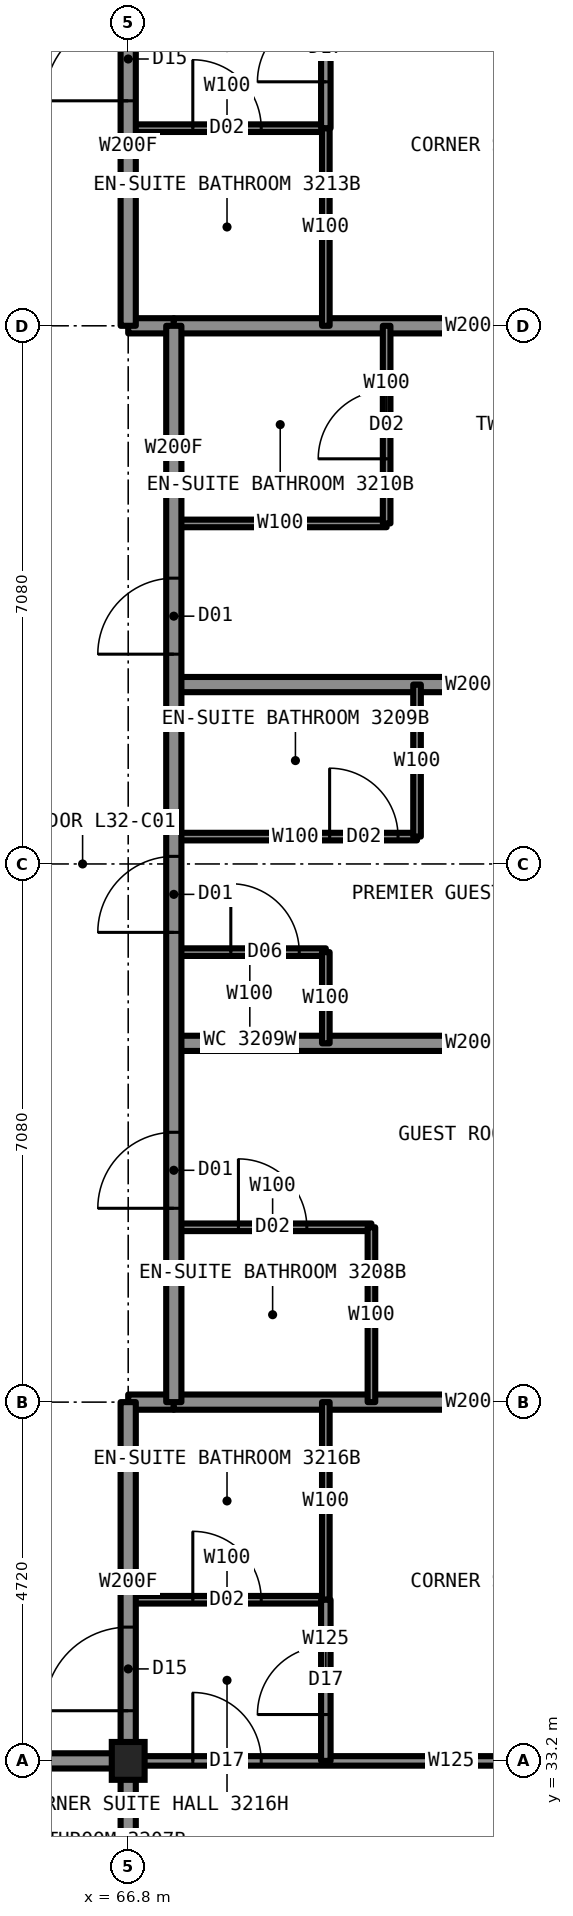
"""IFC4 building model, lengths in metres.
Left out: names, types, materials, properties, quantities, classifications, styles, units other than length and angle.
Written with IfcOpenShell. Run it as: python <this file> out.ifc"""

import sys

from ifc_helpers import new_model, si_unit, direction, frame, frame_2d, origin, origin_2d, place, context, subcontext, project, spatial, rectangle, i_section, extrude, element, fill, save


model = new_model("IFC4")
c1 = context("Model", 3, precision=1e-05, world=origin(), true_north=direction((0.0, 1.0)))
c2 = subcontext(c1, "Body", "Model", "MODEL_VIEW")
j1 = project(units=[si_unit("LENGTHUNIT", "METRE"), si_unit("PLANEANGLEUNIT", "RADIAN")], contexts=[c1])
p1 = place(None, origin())
s1 = spatial("IfcSite", under=j1, at=p1, CompositionType="ELEMENT")
p2 = place(p1, origin())
s2 = spatial("IfcBuilding", under=s1, at=p2, CompositionType="ELEMENT")
p3 = place(p2, frame((0.0, 0.0, 114.4)))
s3 = spatial("IfcBuildingStorey", under=s2, at=p3, CompositionType="ELEMENT", Elevation=114.4)
p4 = place(p3, frame((66.8, 33.2, 0.0), z_axis=(0.0, 0.0, 1.0), x_axis=(1.0, 0.0, 0.0)))
e1 = element("IfcColumn", 1, at=p4, inside=s3, PredefinedType="COLUMN", context=c2, shape_type="SweptSolid", body=[
    extrude(i_section(OverallWidth=0.432, OverallDepth=0.498, WebThickness=0.056, FlangeThickness=0.089, at=origin_2d()), origin(), (0.0, 0.0, 1.0), 3.5),
])
p5 = place(p3, frame((67.4, 43.84, 0.0), z_axis=(0.0, 0.0, 1.0), x_axis=(1.0, 0.0, 0.0)))
e2 = element("IfcWall", 2, at=p5, inside=s3, PredefinedType="PARTITIONING", context=c2, shape_type="SweptSolid", body=[
    extrude(rectangle(XDim=2.0, YDim=0.1, at=frame_2d((1.0, 0.0))), origin(), (0.0, 0.0, 1.0), 3.33),
])
p6 = place(p5, frame((0.75, 0.0, 0.0)))
e3 = element("IfcOpeningElement", 3, at=p6, cuts=e2, PredefinedType="OPENING", context=c2, shape_type="SweptSolid", body=[
    extrude(rectangle(XDim=0.9, YDim=2.1, at=frame_2d((0.45, 1.05))), frame((0.0, 0.06, 0.0), z_axis=(0.0, -1.0, 0.0), x_axis=(1.0, 0.0, 0.0)), (0.0, 0.0, 1.0), 0.12),
])
p7 = place(p3, frame((43.2, 33.2, 0.0), z_axis=(0.0, 0.0, 1.0), x_axis=(1.0, 0.0, 0.0)))
e4 = element("IfcWall", 4, at=p7, inside=s3, PredefinedType="PARTITIONING", context=c2, shape_type="SweptSolid", body=[
    extrude(rectangle(XDim=23.6, YDim=0.2, at=frame_2d((11.8, 0.0))), origin(), (0.0, 0.0, 1.0), 3.33),
])
p8 = place(p7, frame((0.7, 0.0, 0.0)))
e5 = element("IfcOpeningElement", 5, at=p8, cuts=e4, PredefinedType="OPENING", context=c2, shape_type="SweptSolid", body=[
    extrude(rectangle(XDim=1.0, YDim=2.2, at=frame_2d((0.5, 1.1))), frame((0.0, 0.11, 0.0), z_axis=(0.0, -1.0, 0.0), x_axis=(1.0, 0.0, 0.0)), (0.0, 0.0, 1.0), 0.22),
])
p9 = place(p7, frame((6.57, 0.0, 0.0)))
e6 = element("IfcOpeningElement", 6, at=p9, cuts=e4, PredefinedType="OPENING", context=c2, shape_type="SweptSolid", body=[
    extrude(rectangle(XDim=1.1, YDim=2.2, at=frame_2d((0.55, 1.1))), frame((0.0, 0.11, 0.0), z_axis=(0.0, -1.0, 0.0), x_axis=(1.0, 0.0, 0.0)), (0.0, 0.0, 1.0), 0.22),
])
p10 = place(p7, frame((20.34, 0.0, 0.0)))
e7 = element("IfcOpeningElement", 7, at=p10, cuts=e4, PredefinedType="OPENING", context=c2, shape_type="SweptSolid", body=[
    extrude(rectangle(XDim=1.0, YDim=2.2, at=frame_2d((0.5, 1.1))), frame((0.0, 0.11, 0.0), z_axis=(0.0, -1.0, 0.0), x_axis=(1.0, 0.0, 0.0)), (0.0, 0.0, 1.0), 0.22),
])
p11 = place(p3, frame((66.8, 33.2, 0.0), z_axis=(0.0, 0.0, 1.0), x_axis=(1.0, 0.0, 0.0)))
e8 = element("IfcWall", 8, at=p11, inside=s3, PredefinedType="PARTITIONING", context=c2, shape_type="SweptSolid", body=[
    extrude(rectangle(XDim=8.5, YDim=0.125, at=frame_2d((4.25, 0.0))), origin(), (0.0, 0.0, 1.0), 2.573),
])
p12 = place(p11, frame((0.85, 0.0, 0.0)))
e9 = element("IfcOpeningElement", 9, at=p12, cuts=e8, PredefinedType="OPENING", context=c2, shape_type="SweptSolid", body=[
    extrude(rectangle(XDim=0.9, YDim=2.2, at=frame_2d((0.45, 1.1))), frame((0.0, 0.073, 0.0), z_axis=(0.0, -1.0, 0.0), x_axis=(1.0, 0.0, 0.0)), (0.0, 0.0, 1.0), 0.145),
])
p13 = place(p3, frame((67.4, 42.64, 0.0), z_axis=(0.0, 0.0, 1.0), x_axis=(1.0, 0.0, 0.0)))
e10 = element("IfcWall", 10, at=p13, inside=s3, PredefinedType="PARTITIONING", context=c2, shape_type="SweptSolid", body=[
    extrude(rectangle(XDim=7.9, YDim=0.2, at=frame_2d((3.95, 0.0))), origin(), (0.0, 0.0, 1.0), 2.731),
])
p14 = place(p3, frame((67.4, 40.22, 0.0), z_axis=(0.0, 0.0, 1.0), x_axis=(1.0, 0.0, 0.0)))
e11 = element("IfcWall", 11, at=p14, inside=s3, PredefinedType="PARTITIONING", context=c2, shape_type="SweptSolid", body=[
    extrude(rectangle(XDim=2.6, YDim=0.1, at=frame_2d((1.3, 0.0))), origin(), (0.0, 0.0, 1.0), 2.731),
])
p15 = place(p14, frame((0.85, 0.0, 0.0)))
e12 = element("IfcOpeningElement", 12, at=p15, cuts=e11, PredefinedType="OPENING", context=c2, shape_type="SweptSolid", body=[
    extrude(rectangle(XDim=0.9, YDim=2.1, at=frame_2d((0.45, 1.05))), frame((0.0, 0.06, 0.0), z_axis=(0.0, -1.0, 0.0), x_axis=(1.0, 0.0, 0.0)), (0.0, 0.0, 1.0), 0.12),
])
p16 = place(p3, frame((66.8, 37.92, 0.0), z_axis=(0.0, 0.0, 1.0), x_axis=(1.0, 0.0, 0.0)))
e13 = element("IfcWall", 13, at=p16, inside=s3, PredefinedType="PARTITIONING", context=c2, shape_type="SweptSolid", body=[
    extrude(rectangle(XDim=0.6, YDim=0.2, at=frame_2d((0.3, 0.0))), origin(), (0.0, 0.0, 1.0), 2.573),
])
p17 = place(p3, frame((67.4, 37.92, 0.0), z_axis=(0.0, 0.0, 1.0), x_axis=(1.0, 0.0, 0.0)))
e14 = element("IfcWall", 14, at=p17, inside=s3, PredefinedType="PARTITIONING", context=c2, shape_type="SweptSolid", body=[
    extrude(rectangle(XDim=7.9, YDim=0.2, at=frame_2d((3.95, 0.0))), origin(), (0.0, 0.0, 1.0), 2.573),
])
p18 = place(p3, frame((66.8, 35.32, 0.0), z_axis=(0.0, 0.0, 1.0), x_axis=(1.0, 0.0, 0.0)))
e15 = element("IfcWall", 15, at=p18, inside=s3, PredefinedType="PARTITIONING", context=c2, shape_type="SweptSolid", body=[
    extrude(rectangle(XDim=2.6, YDim=0.1, at=frame_2d((1.3, 0.0))), origin(), (0.0, 0.0, 1.0), 3.33),
])
p19 = place(p18, frame((0.85, 0.0, 0.0)))
e16 = element("IfcOpeningElement", 16, at=p19, cuts=e15, PredefinedType="OPENING", context=c2, shape_type="SweptSolid", body=[
    extrude(rectangle(XDim=0.9, YDim=2.1, at=frame_2d((0.45, 1.05))), frame((0.0, 0.06, 0.0), z_axis=(0.0, -1.0, 0.0), x_axis=(1.0, 0.0, 0.0)), (0.0, 0.0, 1.0), 0.12),
])
p20 = place(p3, frame((67.4, 45.36, 0.0), z_axis=(0.0, 0.0, 1.0), x_axis=(1.0, 0.0, 0.0)))
e17 = element("IfcWall", 17, at=p20, inside=s3, PredefinedType="PARTITIONING", context=c2, shape_type="SweptSolid", body=[
    extrude(rectangle(XDim=3.2, YDim=0.1, at=frame_2d((1.6, 0.0))), origin(), (0.0, 0.0, 1.0), 3.33),
])
p21 = place(p20, frame((2.05, 0.0, 0.0)))
e18 = element("IfcOpeningElement", 18, at=p21, cuts=e17, PredefinedType="OPENING", context=c2, shape_type="SweptSolid", body=[
    extrude(rectangle(XDim=0.9, YDim=2.1, at=frame_2d((0.45, 1.05))), frame((0.0, 0.06, 0.0), z_axis=(0.0, -1.0, 0.0), x_axis=(1.0, 0.0, 0.0)), (0.0, 0.0, 1.0), 0.12),
])
p22 = place(p3, frame((67.4, 47.36, 0.0), z_axis=(0.0, 0.0, 1.0), x_axis=(1.0, 0.0, 0.0)))
e19 = element("IfcWall", 19, at=p22, inside=s3, PredefinedType="PARTITIONING", context=c2, shape_type="SweptSolid", body=[
    extrude(rectangle(XDim=7.9, YDim=0.2, at=frame_2d((3.95, 0.0))), origin(), (0.0, 0.0, 1.0), 2.731),
])
p23 = place(p3, frame((67.4, 49.48, 0.0), z_axis=(0.0, 0.0, 1.0), x_axis=(1.0, 0.0, 0.0)))
e20 = element("IfcWall", 20, at=p23, inside=s3, PredefinedType="PARTITIONING", context=c2, shape_type="SweptSolid", body=[
    extrude(rectangle(XDim=2.8, YDim=0.1, at=frame_2d((1.4, 0.0))), origin(), (0.0, 0.0, 1.0), 3.33),
])
p24 = place(p3, frame((66.8, 52.08, 0.0), z_axis=(0.0, 0.0, 1.0), x_axis=(1.0, 0.0, 0.0)))
e21 = element("IfcWall", 21, at=p24, inside=s3, PredefinedType="PARTITIONING", context=c2, shape_type="SweptSolid", body=[
    extrude(rectangle(XDim=0.6, YDim=0.2, at=frame_2d((0.3, 0.0))), origin(), (0.0, 0.0, 1.0), 2.573),
])
p25 = place(p3, frame((67.4, 52.08, 0.0), z_axis=(0.0, 0.0, 1.0), x_axis=(1.0, 0.0, 0.0)))
e22 = element("IfcWall", 22, at=p25, inside=s3, PredefinedType="PARTITIONING", context=c2, shape_type="SweptSolid", body=[
    extrude(rectangle(XDim=7.9, YDim=0.2, at=frame_2d((3.95, 0.0))), origin(), (0.0, 0.0, 1.0), 2.573),
])
p26 = place(p3, frame((66.8, 54.68, 0.0), z_axis=(0.0, 0.0, 1.0), x_axis=(1.0, 0.0, 0.0)))
e23 = element("IfcWall", 23, at=p26, inside=s3, PredefinedType="PARTITIONING", context=c2, shape_type="SweptSolid", body=[
    extrude(rectangle(XDim=2.6, YDim=0.1, at=frame_2d((1.3, 0.0))), origin(), (0.0, 0.0, 1.0), 3.33),
])
p27 = place(p26, frame((0.85, 0.0, 0.0)))
e24 = element("IfcOpeningElement", 24, at=p27, cuts=e23, PredefinedType="OPENING", context=c2, shape_type="SweptSolid", body=[
    extrude(rectangle(XDim=0.9, YDim=2.1, at=frame_2d((0.45, 1.05))), frame((0.0, 0.06, 0.0), z_axis=(0.0, -1.0, 0.0), x_axis=(1.0, 0.0, 0.0)), (0.0, 0.0, 1.0), 0.12),
])
p28 = place(p3, frame((66.8, 33.2, 0.0), z_axis=(0.0, 0.0, 1.0), x_axis=(0.0, 1.0, 0.0)))
e25 = element("IfcWall", 25, at=p28, inside=s3, PredefinedType="PARTITIONING", context=c2, shape_type="SweptSolid", body=[
    extrude(rectangle(XDim=4.72, YDim=0.2, at=frame_2d((2.36, 0.0))), origin(), (0.0, 0.0, 1.0), 3.33),
])
p29 = place(p28, frame((0.66, 0.0, 0.0)))
e26 = element("IfcOpeningElement", 26, at=p29, cuts=e25, PredefinedType="OPENING", context=c2, shape_type="SweptSolid", body=[
    extrude(rectangle(XDim=1.1, YDim=2.2, at=frame_2d((0.55, 1.1))), frame((0.0, 0.11, 0.0), z_axis=(0.0, -1.0, 0.0), x_axis=(1.0, 0.0, 0.0)), (0.0, 0.0, 1.0), 0.22),
])
p30 = place(p3, frame((66.8, 52.08, 0.0), z_axis=(0.0, 0.0, 1.0), x_axis=(0.0, 1.0, 0.0)))
e27 = element("IfcWall", 27, at=p30, inside=s3, PredefinedType="PARTITIONING", context=c2, shape_type="SweptSolid", body=[
    extrude(rectangle(XDim=4.72, YDim=0.2, at=frame_2d((2.36, 0.0))), origin(), (0.0, 0.0, 1.0), 3.33),
])
p31 = place(p30, frame((2.96, 0.0, 0.0)))
e28 = element("IfcOpeningElement", 28, at=p31, cuts=e27, PredefinedType="OPENING", context=c2, shape_type="SweptSolid", body=[
    extrude(rectangle(XDim=1.1, YDim=2.2, at=frame_2d((0.55, 1.1))), frame((0.0, 0.11, 0.0), z_axis=(0.0, -1.0, 0.0), x_axis=(1.0, 0.0, 0.0)), (0.0, 0.0, 1.0), 0.22),
])
p32 = place(p3, frame((66.8, 24.7, 0.0), z_axis=(0.0, 0.0, 1.0), x_axis=(0.0, 1.0, 0.0)))
e29 = element("IfcWall", 29, at=p32, inside=s3, PredefinedType="PARTITIONING", context=c2, shape_type="SweptSolid", body=[
    extrude(rectangle(XDim=8.5, YDim=0.2, at=frame_2d((4.25, 0.0))), origin(), (0.0, 0.0, 1.0), 2.573),
])
p33 = place(p3, frame((67.4, 37.92, 0.0), z_axis=(0.0, 0.0, 1.0), x_axis=(0.0, 1.0, 0.0)))
e30 = element("IfcWall", 30, at=p33, inside=s3, PredefinedType="PARTITIONING", context=c2, shape_type="SweptSolid", body=[
    extrude(rectangle(XDim=14.16, YDim=0.2, at=frame_2d((7.08, 0.0))), origin(), (0.0, 0.0, 1.0), 3.33),
])
p34 = place(p33, frame((2.55, 0.0, 0.0)))
e31 = element("IfcOpeningElement", 31, at=p34, cuts=e30, PredefinedType="OPENING", context=c2, shape_type="SweptSolid", body=[
    extrude(rectangle(XDim=1.0, YDim=2.2, at=frame_2d((0.5, 1.1))), frame((0.0, 0.11, 0.0), z_axis=(0.0, -1.0, 0.0), x_axis=(1.0, 0.0, 0.0)), (0.0, 0.0, 1.0), 0.22),
])
p35 = place(p33, frame((6.18, 0.0, 0.0)))
e32 = element("IfcOpeningElement", 32, at=p35, cuts=e30, PredefinedType="OPENING", context=c2, shape_type="SweptSolid", body=[
    extrude(rectangle(XDim=1.0, YDim=2.2, at=frame_2d((0.5, 1.1))), frame((0.0, 0.11, 0.0), z_axis=(0.0, -1.0, 0.0), x_axis=(1.0, 0.0, 0.0)), (0.0, 0.0, 1.0), 0.22),
])
p36 = place(p33, frame((9.84, 0.0, 0.0)))
e33 = element("IfcOpeningElement", 33, at=p36, cuts=e30, PredefinedType="OPENING", context=c2, shape_type="SweptSolid", body=[
    extrude(rectangle(XDim=1.0, YDim=2.2, at=frame_2d((0.5, 1.1))), frame((0.0, 0.11, 0.0), z_axis=(0.0, -1.0, 0.0), x_axis=(1.0, 0.0, 0.0)), (0.0, 0.0, 1.0), 0.22),
])
p37 = place(p3, frame((69.4, 35.32, 0.0), z_axis=(0.0, 0.0, 1.0), x_axis=(0.0, 1.0, 0.0)))
e34 = element("IfcWall", 34, at=p37, inside=s3, PredefinedType="PARTITIONING", context=c2, shape_type="SweptSolid", body=[
    extrude(rectangle(XDim=2.6, YDim=0.1, at=frame_2d((1.3, 0.0))), origin(), (0.0, 0.0, 1.0), 3.33),
])
p38 = place(p3, frame((69.4, 42.64, 0.0), z_axis=(0.0, 0.0, 1.0), x_axis=(0.0, 1.0, 0.0)))
e35 = element("IfcWall", 35, at=p38, inside=s3, PredefinedType="PARTITIONING", context=c2, shape_type="SweptSolid", body=[
    extrude(rectangle(XDim=1.2, YDim=0.1, at=frame_2d((0.6, 0.0))), origin(), (0.0, 0.0, 1.0), 3.33),
])
p39 = place(p3, frame((69.4, 52.08, 0.0), z_axis=(0.0, 0.0, 1.0), x_axis=(0.0, 1.0, 0.0)))
e36 = element("IfcWall", 36, at=p39, inside=s3, PredefinedType="PARTITIONING", context=c2, shape_type="SweptSolid", body=[
    extrude(rectangle(XDim=2.6, YDim=0.1, at=frame_2d((1.3, 0.0))), origin(), (0.0, 0.0, 1.0), 3.33),
])
p40 = place(p3, frame((69.4, 33.2, 0.0), z_axis=(0.0, 0.0, 1.0), x_axis=(0.0, 1.0, 0.0)))
e37 = element("IfcWall", 37, at=p40, inside=s3, PredefinedType="PARTITIONING", context=c2, shape_type="SweptSolid", body=[
    extrude(rectangle(XDim=2.12, YDim=0.125, at=frame_2d((1.06, 0.0))), origin(), (0.0, 0.0, 1.0), 3.33),
])
p41 = place(p40, frame((0.61, 0.0, 0.0)))
e38 = element("IfcOpeningElement", 38, at=p41, cuts=e37, PredefinedType="OPENING", context=c2, shape_type="SweptSolid", body=[
    extrude(rectangle(XDim=0.9, YDim=2.2, at=frame_2d((0.45, 1.1))), frame((0.0, 0.073, 0.0), z_axis=(0.0, -1.0, 0.0), x_axis=(1.0, 0.0, 0.0)), (0.0, 0.0, 1.0), 0.145),
])
p42 = place(p3, frame((69.4, 54.68, 0.0), z_axis=(0.0, 0.0, 1.0), x_axis=(0.0, 1.0, 0.0)))
e39 = element("IfcWall", 39, at=p42, inside=s3, PredefinedType="PARTITIONING", context=c2, shape_type="SweptSolid", body=[
    extrude(rectangle(XDim=2.12, YDim=0.125, at=frame_2d((1.06, 0.0))), origin(), (0.0, 0.0, 1.0), 3.33),
])
p43 = place(p42, frame((0.61, 0.0, 0.0)))
e40 = element("IfcOpeningElement", 40, at=p43, cuts=e39, PredefinedType="OPENING", context=c2, shape_type="SweptSolid", body=[
    extrude(rectangle(XDim=0.9, YDim=2.2, at=frame_2d((0.45, 1.1))), frame((0.0, 0.073, 0.0), z_axis=(0.0, -1.0, 0.0), x_axis=(1.0, 0.0, 0.0)), (0.0, 0.0, 1.0), 0.145),
])
p44 = place(p3, frame((70.0, 37.92, 0.0), z_axis=(0.0, 0.0, 1.0), x_axis=(0.0, 1.0, 0.0)))
e41 = element("IfcWall", 41, at=p44, inside=s3, PredefinedType="PARTITIONING", context=c2, shape_type="SweptSolid", body=[
    extrude(rectangle(XDim=2.3, YDim=0.1, at=frame_2d((1.15, 0.0))), origin(), (0.0, 0.0, 1.0), 3.33),
])
p45 = place(p3, frame((70.2, 49.48, 0.0), z_axis=(0.0, 0.0, 1.0), x_axis=(0.0, 1.0, 0.0)))
e42 = element("IfcWall", 42, at=p45, inside=s3, PredefinedType="PARTITIONING", context=c2, shape_type="SweptSolid", body=[
    extrude(rectangle(XDim=2.6, YDim=0.1, at=frame_2d((1.3, 0.0))), origin(), (0.0, 0.0, 1.0), 3.33),
])
p46 = place(p45, frame((0.85, 0.0, 0.0)))
e43 = element("IfcOpeningElement", 43, at=p46, cuts=e42, PredefinedType="OPENING", context=c2, shape_type="SweptSolid", body=[
    extrude(rectangle(XDim=0.9, YDim=2.1, at=frame_2d((0.45, 1.05))), frame((0.0, 0.06, 0.0), z_axis=(0.0, -1.0, 0.0), x_axis=(1.0, 0.0, 0.0)), (0.0, 0.0, 1.0), 0.12),
])
p47 = place(p3, frame((70.6, 45.36, 0.0), z_axis=(0.0, 0.0, 1.0), x_axis=(0.0, 1.0, 0.0)))
e44 = element("IfcWall", 44, at=p47, inside=s3, PredefinedType="PARTITIONING", context=c2, shape_type="SweptSolid", body=[
    extrude(rectangle(XDim=2.0, YDim=0.1, at=frame_2d((1.0, 0.0))), origin(), (0.0, 0.0, 1.0), 3.33),
])
p48 = place(p34, origin())
e45 = element("IfcDoor", 45, at=p48, inside=s3, OperationType="SINGLE_SWING_LEFT", PredefinedType="DOOR", context=c2, shape_type="SweptSolid", body=[
    extrude(rectangle(XDim=1.0, YDim=2.2, at=frame_2d((0.5, 1.1))), frame((0.0, 0.025, 0.0), z_axis=(0.0, -1.0, 0.0), x_axis=(1.0, 0.0, 0.0)), (0.0, 0.0, 1.0), 0.05),
])
fill(e31, e45)
p49 = place(p15, origin())
e46 = element("IfcDoor", 46, at=p49, inside=s3, OperationType="SINGLE_SWING_RIGHT", PredefinedType="DOOR", context=c2, shape_type="SweptSolid", body=[
    extrude(rectangle(XDim=0.9, YDim=2.1, at=frame_2d((0.45, 1.05))), frame((0.0, 0.025, 0.0), z_axis=(0.0, -1.0, 0.0), x_axis=(1.0, 0.0, 0.0)), (0.0, 0.0, 1.0), 0.05),
])
fill(e12, e46)
p50 = place(p35, origin())
e47 = element("IfcDoor", 47, at=p50, inside=s3, OperationType="SINGLE_SWING_LEFT", PredefinedType="DOOR", context=c2, shape_type="SweptSolid", body=[
    extrude(rectangle(XDim=1.0, YDim=2.2, at=frame_2d((0.5, 1.1))), frame((0.0, 0.025, 0.0), z_axis=(0.0, -1.0, 0.0), x_axis=(1.0, 0.0, 0.0)), (0.0, 0.0, 1.0), 0.05),
])
fill(e32, e47)
p51 = place(p21, origin())
e48 = element("IfcDoor", 48, at=p51, inside=s3, OperationType="SINGLE_SWING_RIGHT", PredefinedType="DOOR", context=c2, shape_type="SweptSolid", body=[
    extrude(rectangle(XDim=0.9, YDim=2.1, at=frame_2d((0.45, 1.05))), frame((0.0, 0.025, 0.0), z_axis=(0.0, -1.0, 0.0), x_axis=(1.0, 0.0, 0.0)), (0.0, 0.0, 1.0), 0.05),
])
fill(e18, e48)
p52 = place(p6, origin())
e49 = element("IfcDoor", 49, at=p52, inside=s3, OperationType="SINGLE_SWING_LEFT", PredefinedType="DOOR", context=c2, shape_type="SweptSolid", body=[
    extrude(rectangle(XDim=0.9, YDim=2.1, at=frame_2d((0.45, 1.05))), frame((0.0, 0.025, 0.0), z_axis=(0.0, -1.0, 0.0), x_axis=(1.0, 0.0, 0.0)), (0.0, 0.0, 1.0), 0.05),
])
fill(e3, e49)
p53 = place(p36, origin())
e50 = element("IfcDoor", 50, at=p53, inside=s3, OperationType="SINGLE_SWING_LEFT", PredefinedType="DOOR", context=c2, shape_type="SweptSolid", body=[
    extrude(rectangle(XDim=1.0, YDim=2.2, at=frame_2d((0.5, 1.1))), frame((0.0, 0.025, 0.0), z_axis=(0.0, -1.0, 0.0), x_axis=(1.0, 0.0, 0.0)), (0.0, 0.0, 1.0), 0.05),
])
fill(e33, e50)
p54 = place(p46, origin())
e51 = element("IfcDoor", 51, at=p54, inside=s3, OperationType="SINGLE_SWING_RIGHT", PredefinedType="DOOR", context=c2, shape_type="SweptSolid", body=[
    extrude(rectangle(XDim=0.9, YDim=2.1, at=frame_2d((0.45, 1.05))), frame((0.0, 0.025, 0.0), z_axis=(0.0, -1.0, 0.0), x_axis=(1.0, 0.0, 0.0)), (0.0, 0.0, 1.0), 0.05),
])
fill(e43, e51)
p55 = place(p27, origin())
e52 = element("IfcDoor", 52, at=p55, inside=s3, OperationType="SINGLE_SWING_RIGHT", PredefinedType="DOOR", context=c2, shape_type="SweptSolid", body=[
    extrude(rectangle(XDim=0.9, YDim=2.1, at=frame_2d((0.45, 1.05))), frame((0.0, 0.025, 0.0), z_axis=(0.0, -1.0, 0.0), x_axis=(1.0, 0.0, 0.0)), (0.0, 0.0, 1.0), 0.05),
])
fill(e24, e52)
p56 = place(p31, origin())
e53 = element("IfcDoor", 53, at=p56, inside=s3, OperationType="SINGLE_SWING_LEFT", PredefinedType="DOOR", context=c2, shape_type="SweptSolid", body=[
    extrude(rectangle(XDim=1.1, YDim=2.2, at=frame_2d((0.55, 1.1))), frame((0.0, 0.025, 0.0), z_axis=(0.0, -1.0, 0.0), x_axis=(1.0, 0.0, 0.0)), (0.0, 0.0, 1.0), 0.05),
])
fill(e28, e53)
p57 = place(p43, origin())
e54 = element("IfcDoor", 54, at=p57, inside=s3, OperationType="SINGLE_SWING_LEFT", PredefinedType="DOOR", context=c2, shape_type="SweptSolid", body=[
    extrude(rectangle(XDim=0.9, YDim=2.2, at=frame_2d((0.45, 1.1))), frame((0.0, 0.025, 0.0), z_axis=(0.0, -1.0, 0.0), x_axis=(1.0, 0.0, 0.0)), (0.0, 0.0, 1.0), 0.05),
])
fill(e40, e54)
p58 = place(p12, origin())
e55 = element("IfcDoor", 55, at=p58, inside=s3, OperationType="SINGLE_SWING_LEFT", PredefinedType="DOOR", context=c2, shape_type="SweptSolid", body=[
    extrude(rectangle(XDim=0.9, YDim=2.2, at=frame_2d((0.45, 1.1))), frame((0.0, 0.025, 0.0), z_axis=(0.0, -1.0, 0.0), x_axis=(1.0, 0.0, 0.0)), (0.0, 0.0, 1.0), 0.05),
])
fill(e9, e55)
p59 = place(p19, origin())
e56 = element("IfcDoor", 56, at=p59, inside=s3, OperationType="SINGLE_SWING_RIGHT", PredefinedType="DOOR", context=c2, shape_type="SweptSolid", body=[
    extrude(rectangle(XDim=0.9, YDim=2.1, at=frame_2d((0.45, 1.05))), frame((0.0, 0.025, 0.0), z_axis=(0.0, -1.0, 0.0), x_axis=(1.0, 0.0, 0.0)), (0.0, 0.0, 1.0), 0.05),
])
fill(e16, e56)
p60 = place(p29, origin())
e57 = element("IfcDoor", 57, at=p60, inside=s3, OperationType="SINGLE_SWING_LEFT", PredefinedType="DOOR", context=c2, shape_type="SweptSolid", body=[
    extrude(rectangle(XDim=1.1, YDim=2.2, at=frame_2d((0.55, 1.1))), frame((0.0, 0.025, 0.0), z_axis=(0.0, -1.0, 0.0), x_axis=(1.0, 0.0, 0.0)), (0.0, 0.0, 1.0), 0.05),
])
fill(e26, e57)
p61 = place(p41, origin())
e58 = element("IfcDoor", 58, at=p61, inside=s3, OperationType="SINGLE_SWING_LEFT", PredefinedType="DOOR", context=c2, shape_type="SweptSolid", body=[
    extrude(rectangle(XDim=0.9, YDim=2.2, at=frame_2d((0.45, 1.1))), frame((0.0, 0.025, 0.0), z_axis=(0.0, -1.0, 0.0), x_axis=(1.0, 0.0, 0.0)), (0.0, 0.0, 1.0), 0.05),
])
fill(e38, e58)
save(model, sys.argv[1])
